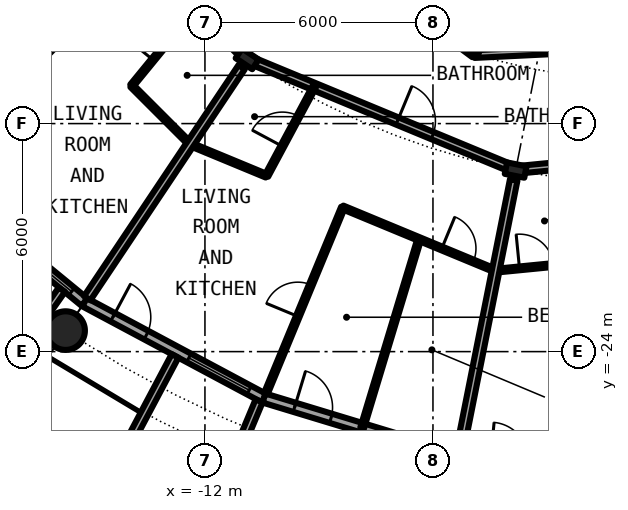
"""IFC4 building model, lengths in metres.
Left out: names, types, materials, properties, quantities, classifications, styles, units other than length and angle.
Written with IfcOpenShell. Run it as: python <this file> out.ifc"""

import sys

from ifc_helpers import new_model, si_unit, direction, frame, frame_2d, origin, origin_2d, place, context, subcontext, project, spatial, rectangle, hollow_circle, i_section, extrude, element, fill, save


model = new_model("IFC4")
c1 = context("Model", 3, precision=1e-05, world=origin(), true_north=direction((0.0, 1.0)))
c2 = subcontext(c1, "Body", "Model", "MODEL_VIEW")
j1 = project(units=[si_unit("LENGTHUNIT", "METRE"), si_unit("PLANEANGLEUNIT", "RADIAN")], contexts=[c1])
p1 = place(None, origin())
s1 = spatial("IfcSite", under=j1, at=p1, CompositionType="ELEMENT")
p2 = place(p1, origin())
s2 = spatial("IfcBuilding", under=s1, at=p2, CompositionType="ELEMENT")
p3 = place(p2, frame((0.0, 0.0, 63.6)))
s3 = spatial("IfcBuildingStorey", under=s2, at=p3, CompositionType="ELEMENT", Elevation=63.6)
p4 = place(p3, frame((-15.667, -23.448, 0.0), z_axis=(0.0, 0.0, 1.0), x_axis=(1.0, 0.0, 0.0)))
e1 = element("IfcColumn", 1, at=p4, inside=s3, PredefinedType="COLUMN", context=c2, shape_type="SweptSolid", body=[
    extrude(hollow_circle(Radius=0.508, WallThickness=0.04, at=origin_2d()), origin(), (0.0, 0.0, 1.0), 3.05),
])
for number, where, z_axis, x_axis in (
    (2, (-10.889, -16.297, 0.0), (0.0, 0.0, 1.0), (-0.556, -0.831, 0.0)),
    (3, (-3.824, -19.223, 0.0), (0.0, 0.0, 1.0), (-0.195, -0.981, 0.0)),
):
    element("IfcColumn", number, at=place(p3, frame(where, z_axis=z_axis, x_axis=x_axis)), inside=s3, PredefinedType="COLUMN", context=c2, shape_type="SweptSolid", body=[
        extrude(i_section(OverallWidth=0.306, OverallDepth=0.524, WebThickness=0.021, FlangeThickness=0.04, FilletRadius=0.027, at=origin_2d()), origin(), (0.0, 0.0, 1.0), 3.05),
    ])
p5 = place(p3, frame((-19.304, -19.304, 0.0), z_axis=(0.0, 0.0, 1.0), x_axis=(0.773019449054, -0.634382322723, 0.0)))
e4 = element("IfcWall", 4, at=p5, inside=s3, PredefinedType="SOLIDWALL", context=c2, shape_type="SweptSolid", body=[
    extrude(rectangle(XDim=5.352, YDim=0.25, at=frame_2d((2.676, 0.0))), origin(), (0.0, 0.0, 1.0), 2.7),
])
p6 = place(p5, frame((0.841, 0.0, 0.0)))
e5 = element("IfcOpeningElement", 5, at=p6, cuts=e4, PredefinedType="OPENING", context=c2, shape_type="SweptSolid", body=[
    extrude(rectangle(XDim=1.0, YDim=2.2, at=frame_2d((0.5, 1.1))), frame((0.0, 0.135, 0.0), z_axis=(0.0, -1.0, 0.0), x_axis=(1.0, 0.0, 0.0)), (0.0, 0.0, 1.0), 0.27),
])
p7 = place(p5, frame((3.111, 0.0, 0.3)))
e6 = element("IfcOpeningElement", 6, at=p7, cuts=e4, PredefinedType="OPENING", context=c2, shape_type="SweptSolid", body=[
    extrude(rectangle(XDim=1.8, YDim=2.1, at=frame_2d((0.9, 1.05))), frame((0.0, 0.135, 0.0), z_axis=(0.0, -1.0, 0.0), x_axis=(1.0, 0.0, 0.0)), (0.0, 0.0, 1.0), 0.27),
])
p8 = place(p3, frame((-15.765, -22.37, -0.03), z_axis=(0.0, 0.0, 1.0), x_axis=(-0.576274612209, -0.817256123454, 0.0)))
e7 = element("IfcWall", 7, at=p8, inside=s3, PredefinedType="SOLIDWALL", context=c2, shape_type="SweptSolid", body=[
    extrude(rectangle(XDim=2.933, YDim=0.2, at=frame_2d((1.466, 0.0))), origin(), (0.0, 0.0, 1.0), 2.73),
])
p9 = place(p3, frame((-15.167, -22.699, 0.0), z_axis=(0.0, 0.0, 1.0), x_axis=(0.881915646801, -0.471407246368, 0.0)))
e8 = element("IfcWall", 8, at=p9, inside=s3, PredefinedType="SOLIDWALL", context=c2, shape_type="SweptSolid", body=[
    extrude(rectangle(XDim=5.352, YDim=0.25, at=frame_2d((2.676, 0.0))), origin(), (0.0, 0.0, 1.0), 2.7),
])
p10 = place(p9, frame((0.841, 0.0, 0.0)))
e9 = element("IfcOpeningElement", 9, at=p10, cuts=e8, PredefinedType="OPENING", context=c2, shape_type="SweptSolid", body=[
    extrude(rectangle(XDim=1.0, YDim=2.2, at=frame_2d((0.5, 1.1))), frame((0.0, 0.135, 0.0), z_axis=(0.0, -1.0, 0.0), x_axis=(1.0, 0.0, 0.0)), (0.0, 0.0, 1.0), 0.27),
])
p11 = place(p9, frame((3.111, 0.0, 0.3)))
e10 = element("IfcOpeningElement", 10, at=p11, cuts=e8, PredefinedType="OPENING", context=c2, shape_type="SweptSolid", body=[
    extrude(rectangle(XDim=1.8, YDim=2.1, at=frame_2d((0.9, 1.05))), frame((0.0, 0.135, 0.0), z_axis=(0.0, -1.0, 0.0), x_axis=(1.0, 0.0, 0.0)), (0.0, 0.0, 1.0), 0.27),
])
p12 = place(p3, frame((-12.787, -24.113, -0.03), z_axis=(0.0, 0.0, 1.0), x_axis=(-0.468365282436, -0.883534924159, 0.0)))
e11 = element("IfcWall", 11, at=p12, inside=s3, PredefinedType="SOLIDWALL", context=c2, shape_type="SweptSolid", body=[
    extrude(rectangle(XDim=3.006, YDim=0.2, at=frame_2d((1.503, 0.0))), origin(), (0.0, 0.0, 1.0), 2.73),
])
p13 = place(p3, frame((-10.575, -25.295, -0.03), z_axis=(0.0, 0.0, 1.0), x_axis=(-0.385697364644, -0.922625353492, 0.0)))
e12 = element("IfcWall", 12, at=p13, inside=s3, PredefinedType="SOLIDWALL", context=c2, shape_type="SweptSolid", body=[
    extrude(rectangle(XDim=2.883, YDim=0.2, at=frame_2d((1.442, 0.0))), origin(), (0.0, 0.0, 1.0), 2.73),
])
p14 = place(p3, frame((-10.447, -25.222, 0.0), z_axis=(0.0, 0.0, 1.0), x_axis=(0.956965678721, -0.290201119486, 0.0)))
e13 = element("IfcWall", 13, at=p14, inside=s3, PredefinedType="SOLIDWALL", context=c2, shape_type="SweptSolid", body=[
    extrude(rectangle(XDim=5.351, YDim=0.25, at=frame_2d((2.676, 0.0))), origin(), (0.0, 0.0, 1.0), 2.7),
])
p15 = place(p14, frame((0.841, 0.0, 0.0)))
e14 = element("IfcOpeningElement", 14, at=p15, cuts=e13, PredefinedType="OPENING", context=c2, shape_type="SweptSolid", body=[
    extrude(rectangle(XDim=1.0, YDim=2.2, at=frame_2d((0.5, 1.1))), frame((0.0, 0.135, 0.0), z_axis=(0.0, -1.0, 0.0), x_axis=(1.0, 0.0, 0.0)), (0.0, 0.0, 1.0), 0.27),
])
p16 = place(p14, frame((3.111, 0.0, 0.3)))
e15 = element("IfcOpeningElement", 15, at=p16, cuts=e13, PredefinedType="OPENING", context=c2, shape_type="SweptSolid", body=[
    extrude(rectangle(XDim=1.8, YDim=2.1, at=frame_2d((0.9, 1.05))), frame((0.0, 0.135, 0.0), z_axis=(0.0, -1.0, 0.0), x_axis=(1.0, 0.0, 0.0)), (0.0, 0.0, 1.0), 0.27),
])
p17 = place(p3, frame((-13.927, -17.004, 0.0), z_axis=(0.0, 0.0, 1.0), x_axis=(0.707106781187, -0.707106781187, 0.0)))
e16 = element("IfcWall", 16, at=p17, inside=s3, PredefinedType="PARTITIONING", context=c2, shape_type="SweptSolid", body=[
    extrude(rectangle(XDim=2.175, YDim=0.1, at=frame_2d((1.088, 0.0))), origin(), (0.0, 0.0, 1.0), 2.7),
])
p18 = place(p3, frame((-12.392, -18.541, 0.0), z_axis=(0.0, 0.0, 1.0), x_axis=(0.923901895183, -0.382629439638, 0.0)))
e17 = element("IfcWall", 17, at=p18, inside=s3, PredefinedType="PARTITIONING", context=c2, shape_type="SweptSolid", body=[
    extrude(rectangle(XDim=2.175, YDim=0.1, at=frame_2d((1.087, 0.0))), origin(), (0.0, 0.0, 1.0), 2.7),
])
p19 = place(p3, frame((-8.376, -20.204, 0.0), z_axis=(0.0, 0.0, 1.0), x_axis=(0.92378218199, -0.382918372814, 0.0)))
e18 = element("IfcWall", 18, at=p19, inside=s3, PredefinedType="PARTITIONING", context=c2, shape_type="SweptSolid", body=[
    extrude(rectangle(XDim=4.364, YDim=0.1, at=frame_2d((2.182, 0.0))), origin(), (0.0, 0.0, 1.0), 2.7),
])
p20 = place(p19, frame((2.823, 0.0, 0.0)))
e19 = element("IfcOpeningElement", 19, at=p20, cuts=e18, PredefinedType="OPENING", context=c2, shape_type="SweptSolid", body=[
    extrude(rectangle(XDim=0.9, YDim=2.3, at=frame_2d((0.45, 1.15))), frame((0.0, 0.06, 0.0), z_axis=(0.0, -1.0, 0.0), x_axis=(1.0, 0.0, 0.0)), (0.0, 0.0, 1.0), 0.12),
])
p21 = place(p3, frame((-4.36, -21.872, 0.0), z_axis=(0.0, 0.0, 1.0), x_axis=(0.995203449084, 0.097826862012, 0.0)))
e20 = element("IfcWall", 20, at=p21, inside=s3, PredefinedType="PARTITIONING", context=c2, shape_type="SweptSolid", body=[
    extrude(rectangle(XDim=4.325, YDim=0.1, at=frame_2d((2.163, 0.0))), origin(), (0.0, 0.0, 1.0), 2.7),
])
p22 = place(p21, frame((0.64, 0.0, 0.0)))
e21 = element("IfcOpeningElement", 21, at=p22, cuts=e20, PredefinedType="OPENING", context=c2, shape_type="SweptSolid", body=[
    extrude(rectangle(XDim=0.9, YDim=2.3, at=frame_2d((0.45, 1.15))), frame((0.0, 0.06, 0.0), z_axis=(0.0, -1.0, 0.0), x_axis=(1.0, 0.0, 0.0)), (0.0, 0.0, 1.0), 0.12),
])
p23 = place(p3, frame((-16.186, -11.0, 0.0), z_axis=(0.0, 0.0, 1.0), x_axis=(0.707106781187, -0.707106781187, 0.0)))
e22 = element("IfcWall", 22, at=p23, inside=s3, PredefinedType="PARTITIONING", context=c2, shape_type="SweptSolid", body=[
    extrude(rectangle(XDim=7.334, YDim=0.2, at=frame_2d((3.667, 0.0))), origin(), (0.0, 0.0, 1.0), 2.38),
])
p24 = place(p23, frame((2.211, 0.0, 0.0)))
e23 = element("IfcOpeningElement", 23, at=p24, cuts=e22, PredefinedType="OPENING", context=c2, shape_type="SweptSolid", body=[
    extrude(rectangle(XDim=1.0, YDim=2.3, at=frame_2d((0.5, 1.15))), frame((0.0, 0.11, 0.0), z_axis=(0.0, -1.0, 0.0), x_axis=(1.0, 0.0, 0.0)), (0.0, 0.0, 1.0), 0.22),
])
p25 = place(p3, frame((-10.745, -16.356, 0.0), z_axis=(0.0, 0.0, 1.0), x_axis=(0.923881347896, -0.382679049609, 0.0)))
e24 = element("IfcWall", 24, at=p25, inside=s3, PredefinedType="PARTITIONING", context=c2, shape_type="SweptSolid", body=[
    extrude(rectangle(XDim=7.335, YDim=0.2, at=frame_2d((3.668, 0.0))), origin(), (0.0, 0.0, 1.0), 2.38),
])
p26 = place(p25, frame((4.124, 0.0, 0.0)))
e25 = element("IfcOpeningElement", 25, at=p26, cuts=e24, PredefinedType="OPENING", context=c2, shape_type="SweptSolid", body=[
    extrude(rectangle(XDim=1.0, YDim=2.3, at=frame_2d((0.5, 1.15))), frame((0.0, 0.11, 0.0), z_axis=(0.0, -1.0, 0.0), x_axis=(1.0, 0.0, 0.0)), (0.0, 0.0, 1.0), 0.22),
])
p27 = place(p3, frame((-3.665, -19.207, 0.0), z_axis=(0.0, 0.0, 1.0), x_axis=(0.995190249661, 0.097961048277, 0.0)))
e26 = element("IfcWall", 26, at=p27, inside=s3, PredefinedType="PARTITIONING", context=c2, shape_type="SweptSolid", body=[
    extrude(rectangle(XDim=11.22, YDim=0.2, at=frame_2d((5.61, 0.0))), origin(), (0.0, 0.0, 1.0), 2.38),
])
p28 = place(p27, frame((4.08, 0.0, 0.0)))
e27 = element("IfcOpeningElement", 27, at=p28, cuts=e26, PredefinedType="OPENING", context=c2, shape_type="SweptSolid", body=[
    extrude(rectangle(XDim=1.0, YDim=2.3, at=frame_2d((0.5, 1.15))), frame((0.0, 0.11, 0.0), z_axis=(0.0, -1.0, 0.0), x_axis=(1.0, 0.0, 0.0)), (0.0, 0.0, 1.0), 0.22),
])
p29 = place(p3, frame((-12.745, -10.358, 0.0), z_axis=(0.0, 0.0, 1.0), x_axis=(0.803191461888, -0.595720971219, 0.0)))
e28 = element("IfcWall", 28, at=p29, inside=s3, PredefinedType="PARTITIONING", context=c2, shape_type="SweptSolid", body=[
    extrude(rectangle(XDim=9.76, YDim=0.2, at=frame_2d((4.88, 0.0))), origin(), (0.0, 0.0, 1.0), 2.7),
])
p30 = place(p29, frame((4.38, 0.0, 0.0)))
e29 = element("IfcOpeningElement", 29, at=p30, cuts=e28, PredefinedType="OPENING", context=c2, shape_type="SweptSolid", body=[
    extrude(rectangle(XDim=1.0, YDim=2.3, at=frame_2d((0.5, 1.15))), frame((0.0, 0.11, 0.0), z_axis=(0.0, -1.0, 0.0), x_axis=(1.0, 0.0, 0.0)), (0.0, 0.0, 1.0), 0.22),
])
p31 = place(p3, frame((-4.909, -16.172, 0.0), z_axis=(0.0, 0.0, 1.0), x_axis=(0.99879913765, 0.048992679355, 0.0)))
e30 = element("IfcWall", 30, at=p31, inside=s3, PredefinedType="PARTITIONING", context=c2, shape_type="SweptSolid", body=[
    extrude(rectangle(XDim=11.392, YDim=0.2, at=frame_2d((5.696, 0.0))), origin(), (0.0, 0.0, 1.0), 2.7),
])
p32 = place(p31, frame((6.011, 0.0, 0.0)))
e31 = element("IfcOpeningElement", 31, at=p32, cuts=e30, PredefinedType="OPENING", context=c2, shape_type="SweptSolid", body=[
    extrude(rectangle(XDim=1.0, YDim=2.3, at=frame_2d((0.5, 1.15))), frame((0.0, 0.11, 0.0), z_axis=(0.0, -1.0, 0.0), x_axis=(1.0, 0.0, 0.0)), (0.0, 0.0, 1.0), 0.22),
])
p33 = place(p3, frame((-19.216, -19.216, 0.0), z_axis=(0.0, 0.0, 1.0), x_axis=(0.707106781187, 0.707106781187, 0.0)))
e32 = element("IfcWall", 32, at=p33, inside=s3, PredefinedType="PARTITIONING", context=c2, shape_type="SweptSolid", body=[
    extrude(rectangle(XDim=5.305, YDim=0.1, at=frame_2d((2.652, 0.0))), origin(), (0.0, 0.0, 1.0), 2.7),
])
p34 = place(p33, frame((2.202, 0.0, 0.0)))
e33 = element("IfcOpeningElement", 33, at=p34, cuts=e32, PredefinedType="OPENING", context=c2, shape_type="SweptSolid", body=[
    extrude(rectangle(XDim=0.9, YDim=2.3, at=frame_2d((0.45, 1.15))), frame((0.0, 0.06, 0.0), z_axis=(0.0, -1.0, 0.0), x_axis=(1.0, 0.0, 0.0)), (0.0, 0.0, 1.0), 0.12),
])
p35 = place(p3, frame((-15.098, -22.595, 0.0), z_axis=(0.0, 0.0, 1.0), x_axis=(0.555701298605, 0.831382022135, 0.0)))
e34 = element("IfcWall", 34, at=p35, inside=s3, PredefinedType="PARTITIONING", context=c2, shape_type="SweptSolid", body=[
    extrude(rectangle(XDim=7.313, YDim=0.2, at=frame_2d((3.657, 0.0))), origin(), (0.0, 0.0, 1.0), 2.7),
])
p36 = place(p3, frame((-13.927, -17.004, 0.0), z_axis=(0.0, 0.0, 1.0), x_axis=(0.633582447834, 0.77367517848, 0.0)))
e35 = element("IfcWall", 35, at=p36, inside=s3, PredefinedType="PARTITIONING", context=c2, shape_type="SweptSolid", body=[
    extrude(rectangle(XDim=2.661, YDim=0.1, at=frame_2d((1.331, 0.0))), origin(), (0.0, 0.0, 1.0), 2.7),
])
p37 = place(p36, frame((0.881, 0.0, 0.0)))
e36 = element("IfcOpeningElement", 36, at=p37, cuts=e35, PredefinedType="OPENING", context=c2, shape_type="SweptSolid", body=[
    extrude(rectangle(XDim=0.9, YDim=2.3, at=frame_2d((0.45, 1.15))), frame((0.0, 0.06, 0.0), z_axis=(0.0, -1.0, 0.0), x_axis=(1.0, 0.0, 0.0)), (0.0, 0.0, 1.0), 0.12),
])
p38 = place(p3, frame((-10.399, -25.106, 0.0), z_axis=(0.0, 0.0, 1.0), x_axis=(0.382620183578, 0.92390572848, 0.0)))
e37 = element("IfcWall", 37, at=p38, inside=s3, PredefinedType="PARTITIONING", context=c2, shape_type="SweptSolid", body=[
    extrude(rectangle(XDim=5.302, YDim=0.1, at=frame_2d((2.651, 0.0))), origin(), (0.0, 0.0, 1.0), 2.7),
])
p39 = place(p38, frame((2.201, 0.0, 0.0)))
e38 = element("IfcOpeningElement", 38, at=p39, cuts=e37, PredefinedType="OPENING", context=c2, shape_type="SweptSolid", body=[
    extrude(rectangle(XDim=0.9, YDim=2.3, at=frame_2d((0.45, 1.15))), frame((0.0, 0.06, 0.0), z_axis=(0.0, -1.0, 0.0), x_axis=(1.0, 0.0, 0.0)), (0.0, 0.0, 1.0), 0.12),
])
p40 = place(p3, frame((-10.38, -19.374, 0.0), z_axis=(0.0, 0.0, 1.0), x_axis=(0.472244323015, 0.881467696164, 0.0)))
e39 = element("IfcWall", 39, at=p40, inside=s3, PredefinedType="PARTITIONING", context=c2, shape_type="SweptSolid", body=[
    extrude(rectangle(XDim=2.661, YDim=0.1, at=frame_2d((1.331, 0.0))), origin(), (0.0, 0.0, 1.0), 2.7),
])
p41 = place(p40, frame((0.881, 0.0, 0.0)))
e40 = element("IfcOpeningElement", 40, at=p41, cuts=e39, PredefinedType="OPENING", context=c2, shape_type="SweptSolid", body=[
    extrude(rectangle(XDim=0.9, YDim=2.3, at=frame_2d((0.45, 1.15))), frame((0.0, 0.06, 0.0), z_axis=(0.0, -1.0, 0.0), x_axis=(1.0, 0.0, 0.0)), (0.0, 0.0, 1.0), 0.12),
])
p42 = place(p3, frame((-7.864, -26.012, 0.0), z_axis=(0.0, 0.0, 1.0), x_axis=(0.289472609969, 0.957186297477, 0.0)))
e41 = element("IfcWall", 41, at=p42, inside=s3, PredefinedType="PARTITIONING", context=c2, shape_type="SweptSolid", body=[
    extrude(rectangle(XDim=5.195, YDim=0.1, at=frame_2d((2.598, 0.0))), origin(), (0.0, 0.0, 1.0), 2.7),
])
p43 = place(p3, frame((-5.302, -26.653, 0.0), z_axis=(0.0, 0.0, 1.0), x_axis=(0.195114589291, 0.98078045303, 0.0)))
e42 = element("IfcWall", 42, at=p43, inside=s3, PredefinedType="PARTITIONING", context=c2, shape_type="SweptSolid", body=[
    extrude(rectangle(XDim=7.314, YDim=0.2, at=frame_2d((3.657, 0.0))), origin(), (0.0, 0.0, 1.0), 2.7),
])
p44 = place(p3, frame((-4.906, -16.172, 0.0), z_axis=(0.0, 0.0, 1.0), x_axis=(0.290420725025, 0.956899055531, 0.0)))
e43 = element("IfcWall", 43, at=p44, inside=s3, PredefinedType="PARTITIONING", context=c2, shape_type="SweptSolid", body=[
    extrude(rectangle(XDim=9.18, YDim=0.2, at=frame_2d((4.59, 0.0))), origin(), (0.0, 0.0, 1.0), 2.7),
])
p45 = place(p7, origin())
e44 = element("IfcWindow", 44, at=p45, inside=s3, PartitioningType="SINGLE_PANEL", PredefinedType="WINDOW", context=c2, shape_type="SweptSolid", body=[
    extrude(rectangle(XDim=1.8, YDim=2.1, at=frame_2d((0.9, 1.05))), frame((0.0, 0.03, 0.0), z_axis=(0.0, -1.0, 0.0), x_axis=(1.0, 0.0, 0.0)), (0.0, 0.0, 1.0), 0.06),
])
fill(e6, e44)
p46 = place(p10, origin())
e45 = element("IfcDoor", 45, at=p46, inside=s3, OperationType="SINGLE_SWING_LEFT", PredefinedType="DOOR", context=c2, shape_type="SweptSolid", body=[
    extrude(rectangle(XDim=1.0, YDim=2.2, at=frame_2d((0.5, 1.1))), frame((0.0, 0.025, 0.0), z_axis=(0.0, -1.0, 0.0), x_axis=(1.0, 0.0, 0.0)), (0.0, 0.0, 1.0), 0.05),
])
fill(e9, e45)
p47 = place(p11, origin())
e46 = element("IfcWindow", 46, at=p47, inside=s3, PartitioningType="SINGLE_PANEL", PredefinedType="WINDOW", context=c2, shape_type="SweptSolid", body=[
    extrude(rectangle(XDim=1.8, YDim=2.1, at=frame_2d((0.9, 1.05))), frame((0.0, 0.03, 0.0), z_axis=(0.0, -1.0, 0.0), x_axis=(1.0, 0.0, 0.0)), (0.0, 0.0, 1.0), 0.06),
])
fill(e10, e46)
p48 = place(p15, origin())
e47 = element("IfcDoor", 47, at=p48, inside=s3, OperationType="SINGLE_SWING_LEFT", PredefinedType="DOOR", context=c2, shape_type="SweptSolid", body=[
    extrude(rectangle(XDim=1.0, YDim=2.2, at=frame_2d((0.5, 1.1))), frame((0.0, 0.025, 0.0), z_axis=(0.0, -1.0, 0.0), x_axis=(1.0, 0.0, 0.0)), (0.0, 0.0, 1.0), 0.05),
])
fill(e14, e47)
p49 = place(p37, origin())
e48 = element("IfcDoor", 48, at=p49, inside=s3, OperationType="SINGLE_SWING_RIGHT", PredefinedType="DOOR", context=c2, shape_type="SweptSolid", body=[
    extrude(rectangle(XDim=0.9, YDim=2.3, at=frame_2d((0.45, 1.15))), frame((0.0, 0.025, 0.0), z_axis=(0.0, -1.0, 0.0), x_axis=(1.0, 0.0, 0.0)), (0.0, 0.0, 1.0), 0.05),
])
fill(e36, e48)
p50 = place(p26, origin())
e49 = element("IfcDoor", 49, at=p50, inside=s3, OperationType="SINGLE_SWING_RIGHT", PredefinedType="DOOR", context=c2, shape_type="SweptSolid", body=[
    extrude(rectangle(XDim=1.0, YDim=2.3, at=frame_2d((0.5, 1.15))), frame((0.0, 0.025, 0.0), z_axis=(0.0, -1.0, 0.0), x_axis=(1.0, 0.0, 0.0)), (0.0, 0.0, 1.0), 0.05),
])
fill(e25, e49)
p51 = place(p41, origin())
e50 = element("IfcDoor", 50, at=p51, inside=s3, OperationType="SINGLE_SWING_RIGHT", PredefinedType="DOOR", context=c2, shape_type="SweptSolid", body=[
    extrude(rectangle(XDim=0.9, YDim=2.3, at=frame_2d((0.45, 1.15))), frame((0.0, 0.025, 0.0), z_axis=(0.0, -1.0, 0.0), x_axis=(1.0, 0.0, 0.0)), (0.0, 0.0, 1.0), 0.05),
])
fill(e40, e50)
p52 = place(p39, origin())
e51 = element("IfcDoor", 51, at=p52, inside=s3, OperationType="SINGLE_SWING_LEFT", PredefinedType="DOOR", context=c2, shape_type="SweptSolid", body=[
    extrude(rectangle(XDim=0.9, YDim=2.3, at=frame_2d((0.45, 1.15))), frame((0.0, 0.025, 0.0), z_axis=(0.0, -1.0, 0.0), x_axis=(1.0, 0.0, 0.0)), (0.0, 0.0, 1.0), 0.05),
])
fill(e38, e51)
p53 = place(p20, origin())
e52 = element("IfcDoor", 52, at=p53, inside=s3, OperationType="SINGLE_SWING_RIGHT", PredefinedType="DOOR", context=c2, shape_type="SweptSolid", body=[
    extrude(rectangle(XDim=0.9, YDim=2.3, at=frame_2d((0.45, 1.15))), frame((0.0, 0.025, 0.0), z_axis=(0.0, -1.0, 0.0), x_axis=(1.0, 0.0, 0.0)), (0.0, 0.0, 1.0), 0.05),
])
fill(e19, e52)
p54 = place(p22, origin())
e53 = element("IfcDoor", 53, at=p54, inside=s3, OperationType="SINGLE_SWING_LEFT", PredefinedType="DOOR", context=c2, shape_type="SweptSolid", body=[
    extrude(rectangle(XDim=0.9, YDim=2.3, at=frame_2d((0.45, 1.15))), frame((0.0, 0.025, 0.0), z_axis=(0.0, -1.0, 0.0), x_axis=(1.0, 0.0, 0.0)), (0.0, 0.0, 1.0), 0.05),
])
fill(e21, e53)
save(model, sys.argv[1])
